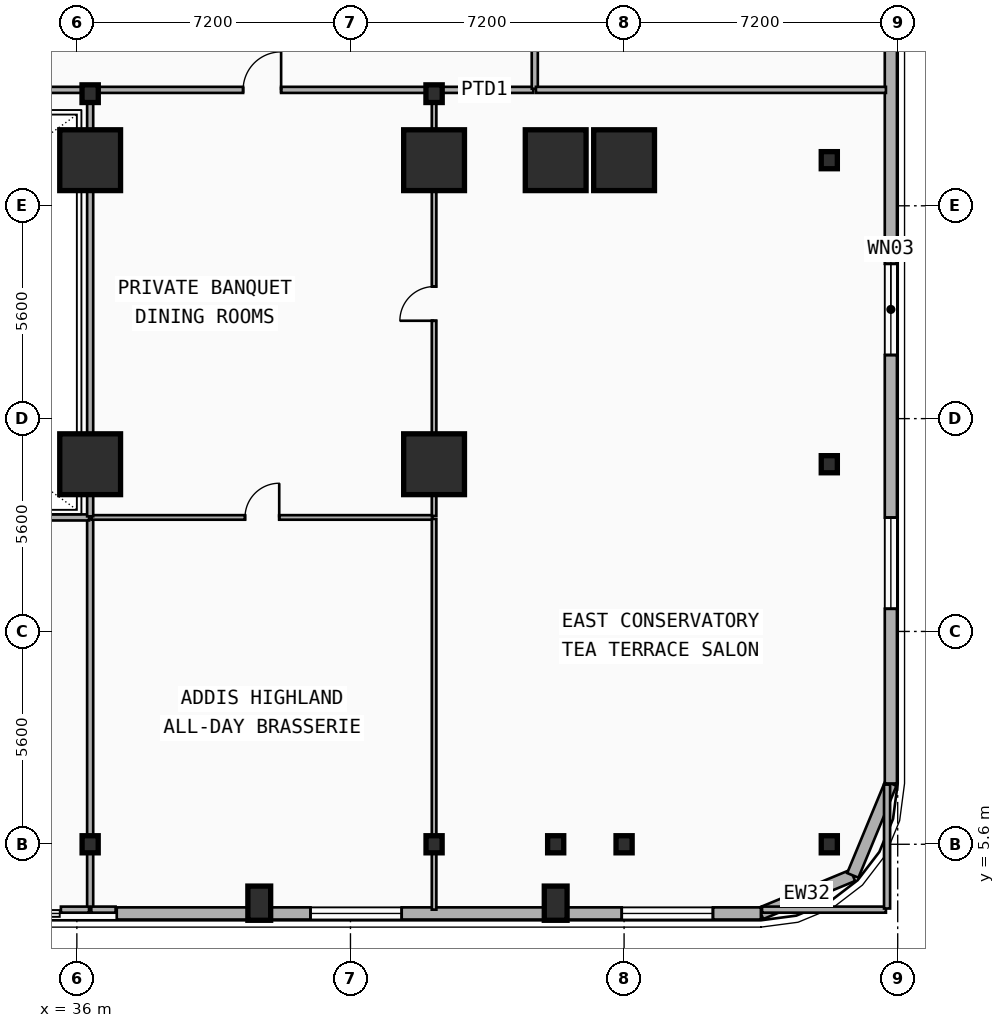
"""IFC4 building model, lengths in metres.
Left out: names, types, materials, properties, quantities, classifications, styles, units other than length and angle.
Written with IfcOpenShell. Run it as: python <this file> out.ifc"""

import sys

from ifc_helpers import new_model, si_unit, direction, frame, frame_2d, origin, origin_2d, place, context, subcontext, project, spatial, rectangle, i_section, extrude, element, fill, save


model = new_model("IFC4")
c1 = context("Model", 3, precision=1e-05, world=origin(), true_north=direction((0.0, 1.0)))
c2 = subcontext(c1, "Body", "Model", "MODEL_VIEW")
j1 = project(units=[si_unit("LENGTHUNIT", "METRE"), si_unit("PLANEANGLEUNIT", "RADIAN")], contexts=[c1])
p1 = place(None, origin())
s1 = spatial("IfcSite", under=j1, at=p1, CompositionType="ELEMENT")
p2 = place(p1, origin())
s2 = spatial("IfcBuilding", under=s1, at=p2, CompositionType="ELEMENT")
p3 = place(p2, frame((0.0, 0.0, 14.9)))
s3 = spatial("IfcBuildingStorey", under=s2, at=p3, CompositionType="ELEMENT", Elevation=14.9)
for number, where, z_axis, x_axis in (
    (1, (36.35, 25.35, 0.0), (0.0, 0.0, 1.0), (1.0, 0.0, 0.0)),
    (2, (45.4, 25.35, 0.0), (0.0, 0.0, 1.0), (1.0, 0.0, 0.0)),
):
    element("IfcColumn", number, at=place(p3, frame(where, z_axis=z_axis, x_axis=x_axis)), inside=s3, PredefinedType="COLUMN", context=c2, shape_type="SweptSolid", body=[
        extrude(i_section(OverallWidth=0.428, OverallDepth=0.465, WebThickness=0.045, FlangeThickness=0.073, FilletRadius=0.015, at=origin_2d()), origin(), (0.0, 0.0, 1.0), 4.5),
    ])
p4 = place(p3, frame((36.35, 5.6, 0.0), z_axis=(0.0, 0.0, 1.0), x_axis=(1.0, 0.0, 0.0)))
e3 = element("IfcColumn", 3, at=p4, inside=s3, PredefinedType="COLUMN", context=c2, shape_type="SweptSolid", body=[
    extrude(i_section(OverallWidth=0.424, OverallDepth=0.45, WebThickness=0.041, FlangeThickness=0.065, FilletRadius=0.015, at=origin_2d()), origin(), (0.0, 0.0, 1.0), 4.5),
])
for number, where, z_axis, x_axis in (
    (4, (36.35, 15.6, 0.0), (0.0, 0.0, 1.0), (1.0, 0.0, 0.0)),
    (5, (36.35, 23.6, 0.0), (0.0, 0.0, 1.0), (1.0, 0.0, 0.0)),
):
    element("IfcColumn", number, at=place(p3, frame(where, z_axis=z_axis, x_axis=x_axis)), inside=s3, PredefinedType="COLUMN", context=c2, shape_type="SweptSolid", body=[
        extrude(rectangle(XDim=1.6, YDim=1.6, at=origin_2d()), origin(), (0.0, 0.0, 1.0), 4.5),
    ])
p5 = place(p3, frame((45.4, 5.6, 0.0), z_axis=(0.0, 0.0, 1.0), x_axis=(1.0, 0.0, 0.0)))
e6 = element("IfcColumn", 6, at=p5, inside=s3, PredefinedType="COLUMN", context=c2, shape_type="SweptSolid", body=[
    extrude(i_section(OverallWidth=0.424, OverallDepth=0.45, WebThickness=0.041, FlangeThickness=0.065, FilletRadius=0.015, at=origin_2d()), origin(), (0.0, 0.0, 1.0), 4.5),
])
for number, where, z_axis, x_axis in (
    (7, (45.4, 15.6, 0.0), (0.0, 0.0, 1.0), (1.0, 0.0, 0.0)),
    (8, (45.4, 23.6, 0.0), (0.0, 0.0, 1.0), (1.0, 0.0, 0.0)),
):
    element("IfcColumn", number, at=place(p3, frame(where, z_axis=z_axis, x_axis=x_axis)), inside=s3, PredefinedType="COLUMN", context=c2, shape_type="SweptSolid", body=[
        extrude(rectangle(XDim=1.6, YDim=1.6, at=origin_2d()), origin(), (0.0, 0.0, 1.0), 4.5),
    ])
p6 = place(p3, frame((48.6, 5.6, 0.0), z_axis=(0.0, 0.0, 1.0), x_axis=(1.0, 0.0, 0.0)))
e9 = element("IfcColumn", 9, at=p6, inside=s3, PredefinedType="COLUMN", context=c2, shape_type="SweptSolid", body=[
    extrude(i_section(OverallWidth=0.424, OverallDepth=0.45, WebThickness=0.041, FlangeThickness=0.065, FilletRadius=0.015, at=origin_2d()), origin(), (0.0, 0.0, 1.0), 4.5),
])
p7 = place(p3, frame((48.6, 23.6, 0.0), z_axis=(0.0, 0.0, 1.0), x_axis=(1.0, 0.0, 0.0)))
e10 = element("IfcColumn", 10, at=p7, inside=s3, PredefinedType="COLUMN", context=c2, shape_type="SweptSolid", body=[
    extrude(rectangle(XDim=1.6, YDim=1.6, at=origin_2d()), origin(), (0.0, 0.0, 1.0), 4.5),
])
p8 = place(p3, frame((50.4, 5.6, 0.0), z_axis=(0.0, 0.0, 1.0), x_axis=(1.0, 0.0, 0.0)))
e11 = element("IfcColumn", 11, at=p8, inside=s3, PredefinedType="COLUMN", context=c2, shape_type="SweptSolid", body=[
    extrude(i_section(OverallWidth=0.424, OverallDepth=0.45, WebThickness=0.041, FlangeThickness=0.065, FilletRadius=0.015, at=origin_2d()), origin(), (0.0, 0.0, 1.0), 4.5),
])
p9 = place(p3, frame((50.4, 23.6, 0.0), z_axis=(0.0, 0.0, 1.0), x_axis=(1.0, 0.0, 0.0)))
e12 = element("IfcColumn", 12, at=p9, inside=s3, PredefinedType="COLUMN", context=c2, shape_type="SweptSolid", body=[
    extrude(rectangle(XDim=1.6, YDim=1.6, at=origin_2d()), origin(), (0.0, 0.0, 1.0), 4.5),
])
for number, where, z_axis, x_axis in (
    (13, (55.8, 5.6, 0.0), (0.0, 0.0, 1.0), (1.0, 0.0, 0.0)),
    (14, (55.8, 15.6, 0.0), (0.0, 0.0, 1.0), (1.0, 0.0, 0.0)),
    (15, (55.8, 23.6, 0.0), (0.0, 0.0, 1.0), (1.0, 0.0, 0.0)),
):
    element("IfcColumn", number, at=place(p3, frame(where, z_axis=z_axis, x_axis=x_axis)), inside=s3, PredefinedType="COLUMN", context=c2, shape_type="SweptSolid", body=[
        extrude(i_section(OverallWidth=0.424, OverallDepth=0.45, WebThickness=0.041, FlangeThickness=0.065, FilletRadius=0.015, at=origin_2d()), origin(), (0.0, 0.0, 1.0), 4.5),
    ])
for number, where, z_axis, x_axis in (
    (16, (40.8, 4.05, 0.0), (0.0, 0.0, 1.0), (1.0, 0.0, 0.0)),
    (17, (48.6, 4.05, 0.0), (0.0, 0.0, 1.0), (1.0, 0.0, 0.0)),
):
    element("IfcColumn", number, at=place(p3, frame(where, z_axis=z_axis, x_axis=x_axis)), inside=s3, PredefinedType="PILASTER", context=c2, shape_type="SweptSolid", body=[
        extrude(rectangle(XDim=0.6, YDim=0.9, at=origin_2d()), origin(), (0.0, 0.0, 1.0), 4.5),
    ])
for number, where, z_axis, x_axis in (
    (18, (56.418, 4.782, 0.0), (0.0, 0.0, 1.0), (-0.924, -0.383, 0.0)),
    (19, (57.42, 7.2, 0.0), (0.0, 0.0, 1.0), (-0.383, -0.924, 0.0)),
):
    element("IfcWall", number, at=place(p3, frame(where, z_axis=z_axis, x_axis=x_axis)), inside=s3, PredefinedType="SOLIDWALL", context=c2, shape_type="SweptSolid", body=[
        extrude(rectangle(XDim=2.617, YDim=0.32, at=frame_2d((1.309, 0.0))), origin(), (0.0, 0.0, 1.0), 4.2),
    ])
p10 = place(p3, frame((57.42, 41.6, 0.0), z_axis=(0.0, 0.0, 1.0), x_axis=(0.0, -1.0, 0.0)))
e20 = element("IfcWall", 20, at=p10, inside=s3, PredefinedType="SOLIDWALL", context=c2, shape_type="SweptSolid", body=[
    extrude(rectangle(XDim=34.4, YDim=0.32, at=frame_2d((17.2, 0.0))), origin(), (0.0, 0.0, 1.0), 4.2),
])
p11 = place(p10, frame((20.727, 0.0, 0.9)))
e21 = element("IfcOpeningElement", 21, at=p11, cuts=e20, PredefinedType="OPENING", context=c2, shape_type="SweptSolid", body=[
    extrude(rectangle(XDim=2.4, YDim=1.8, at=frame_2d((1.2, 0.9))), frame((0.0, 0.17, 0.0), z_axis=(0.0, -1.0, 0.0), x_axis=(1.0, 0.0, 0.0)), (0.0, 0.0, 1.0), 0.34),
])
p12 = place(p10, frame((27.403, 0.0, 0.9)))
e22 = element("IfcOpeningElement", 22, at=p12, cuts=e20, PredefinedType="OPENING", context=c2, shape_type="SweptSolid", body=[
    extrude(rectangle(XDim=2.4, YDim=1.8, at=frame_2d((1.2, 0.9))), frame((0.0, 0.17, 0.0), z_axis=(0.0, -1.0, 0.0), x_axis=(1.0, 0.0, 0.0)), (0.0, 0.0, 1.0), 0.34),
])
p13 = place(p3, frame((54.0, 3.78, 0.0), z_axis=(0.0, 0.0, 1.0), x_axis=(-1.0, 0.0, 0.0)))
e23 = element("IfcWall", 23, at=p13, inside=s3, PredefinedType="SOLIDWALL", context=c2, shape_type="SweptSolid", body=[
    extrude(rectangle(XDim=16.95, YDim=0.32, at=frame_2d((8.475, 0.0))), origin(), (0.0, 0.0, 1.0), 4.2),
])
p14 = place(p13, frame((9.452, 0.0, 0.9)))
e24 = element("IfcOpeningElement", 24, at=p14, cuts=e23, PredefinedType="OPENING", context=c2, shape_type="SweptSolid", body=[
    extrude(rectangle(XDim=2.4, YDim=1.8, at=frame_2d((1.2, 0.9))), frame((0.0, 0.17, 0.0), z_axis=(0.0, -1.0, 0.0), x_axis=(1.0, 0.0, 0.0)), (0.0, 0.0, 1.0), 0.34),
])
p15 = place(p13, frame((1.262, 0.0, 0.9)))
e25 = element("IfcOpeningElement", 25, at=p15, cuts=e23, PredefinedType="OPENING", context=c2, shape_type="SweptSolid", body=[
    extrude(rectangle(XDim=2.4, YDim=1.8, at=frame_2d((1.2, 0.9))), frame((0.0, 0.17, 0.0), z_axis=(0.0, -1.0, 0.0), x_axis=(1.0, 0.0, 0.0)), (0.0, 0.0, 1.0), 0.34),
])
p16 = place(p3, frame((36.39, 25.45, 0.0), z_axis=(0.0, 0.0, 1.0), x_axis=(1.0, 0.0, 0.0)))
e26 = element("IfcWall", 26, at=p16, inside=s3, PredefinedType="PARTITIONING", context=c2, shape_type="SweptSolid", body=[
    extrude(rectangle(XDim=8.97, YDim=0.16, at=frame_2d((4.485, 0.0))), origin(), (0.0, 0.0, 1.0), 3.366),
])
p17 = place(p16, frame((3.985, 0.0, 0.0)))
e27 = element("IfcOpeningElement", 27, at=p17, cuts=e26, PredefinedType="OPENING", context=c2, shape_type="SweptSolid", body=[
    extrude(rectangle(XDim=1.0, YDim=2.15, at=frame_2d((0.5, 1.075))), frame((0.0, 0.09, 0.0), z_axis=(0.0, -1.0, 0.0), x_axis=(1.0, 0.0, 0.0)), (0.0, 0.0, 1.0), 0.18),
])
p18 = place(p3, frame((45.44, 25.45, 0.0), z_axis=(0.0, 0.0, 1.0), x_axis=(1.0, 0.0, 0.0)))
e28 = element("IfcWall", 28, at=p18, inside=s3, PredefinedType="PARTITIONING", context=c2, shape_type="SweptSolid", body=[
    extrude(rectangle(XDim=2.57, YDim=0.16, at=frame_2d((1.285, 0.0))), origin(), (0.0, 0.0, 1.0), 3.366),
])
p19 = place(p3, frame((36.35, 3.88, 0.0), z_axis=(0.0, 0.0, 1.0), x_axis=(0.0, 1.0, 0.0)))
e29 = element("IfcWall", 29, at=p19, inside=s3, PredefinedType="PARTITIONING", context=c2, shape_type="SweptSolid", body=[
    extrude(rectangle(XDim=10.28, YDim=0.16, at=frame_2d((5.14, 0.0))), origin(), (0.0, 0.0, 1.0), 3.366),
])
p20 = place(p3, frame((36.39, 14.2, 0.0), z_axis=(0.0, 0.0, 1.0), x_axis=(1.0, 0.0, 0.0)))
e30 = element("IfcWall", 30, at=p20, inside=s3, PredefinedType="PARTITIONING", context=c2, shape_type="SweptSolid", body=[
    extrude(rectangle(XDim=8.97, YDim=0.12, at=frame_2d((4.485, 0.0))), origin(), (0.0, 0.0, 1.0), 3.366),
])
p21 = place(p20, frame((4.035, 0.0, 0.0)))
e31 = element("IfcOpeningElement", 31, at=p21, cuts=e30, PredefinedType="OPENING", context=c2, shape_type="SweptSolid", body=[
    extrude(rectangle(XDim=0.9, YDim=2.1, at=frame_2d((0.45, 1.05))), frame((0.0, 0.07, 0.0), z_axis=(0.0, -1.0, 0.0), x_axis=(1.0, 0.0, 0.0)), (0.0, 0.0, 1.0), 0.14),
])
p22 = place(p3, frame((45.4, 3.88, 0.0), z_axis=(0.0, 0.0, 1.0), x_axis=(0.0, 1.0, 0.0)))
e32 = element("IfcWall", 32, at=p22, inside=s3, PredefinedType="PARTITIONING", context=c2, shape_type="SweptSolid", body=[
    extrude(rectangle(XDim=10.28, YDim=0.12, at=frame_2d((5.14, 0.0))), origin(), (0.0, 0.0, 1.0), 3.366),
])
p23 = place(p3, frame((45.4, 14.24, 0.0), z_axis=(0.0, 0.0, 1.0), x_axis=(0.0, 1.0, 0.0)))
e33 = element("IfcWall", 33, at=p23, inside=s3, PredefinedType="PARTITIONING", context=c2, shape_type="SweptSolid", body=[
    extrude(rectangle(XDim=11.17, YDim=0.12, at=frame_2d((5.585, 0.0))), origin(), (0.0, 0.0, 1.0), 3.172),
])
p24 = place(p23, frame((5.135, 0.0, 0.0)))
e34 = element("IfcOpeningElement", 34, at=p24, cuts=e33, PredefinedType="OPENING", context=c2, shape_type="SweptSolid", body=[
    extrude(rectangle(XDim=0.9, YDim=2.1, at=frame_2d((0.45, 1.05))), frame((0.0, 0.07, 0.0), z_axis=(0.0, -1.0, 0.0), x_axis=(1.0, 0.0, 0.0)), (0.0, 0.0, 1.0), 0.14),
])
p25 = place(p3, frame((20.38, 25.45, 0.0), z_axis=(0.0, 0.0, 1.0), x_axis=(1.0, 0.0, 0.0)))
e35 = element("IfcWall", 35, at=p25, inside=s3, PredefinedType="PARTITIONING", context=c2, shape_type="SweptSolid", body=[
    extrude(rectangle(XDim=15.94, YDim=0.16, at=frame_2d((7.97, 0.0))), origin(), (0.0, 0.0, 1.0), 3.366),
])
p26 = place(p3, frame((48.05, 25.48, 0.0), z_axis=(0.0, 0.0, 1.0), x_axis=(0.0, 1.0, 0.0)))
e36 = element("IfcWall", 36, at=p26, inside=s3, PredefinedType="PARTITIONING", context=c2, shape_type="SweptSolid", body=[
    extrude(rectangle(XDim=2.09, YDim=0.16, at=frame_2d((1.045, 0.0))), origin(), (0.0, 0.0, 1.0), 4.2),
])
p27 = place(p3, frame((35.58, 3.88, 0.0), z_axis=(0.0, 0.0, 1.0), x_axis=(1.0, 0.0, 0.0)))
e37 = element("IfcWall", 37, at=p27, inside=s3, PredefinedType="PARTITIONING", context=c2, shape_type="SweptSolid", body=[
    extrude(rectangle(XDim=0.74, YDim=0.16, at=frame_2d((0.37, 0.0))), origin(), (0.0, 0.0, 1.0), 4.2),
])
p28 = place(p3, frame((20.38, 14.2, 0.0), z_axis=(0.0, 0.0, 1.0), x_axis=(1.0, 0.0, 0.0)))
e38 = element("IfcWall", 38, at=p28, inside=s3, PredefinedType="PARTITIONING", context=c2, shape_type="SweptSolid", body=[
    extrude(rectangle(XDim=15.94, YDim=0.16, at=frame_2d((7.97, 0.0))), origin(), (0.0, 0.0, 1.0), 3.366),
])
p29 = place(p3, frame((36.38, 3.88, 0.0), z_axis=(0.0, 0.0, 1.0), x_axis=(1.0, 0.0, 0.0)))
e39 = element("IfcWall", 39, at=p29, inside=s3, PredefinedType="PARTITIONING", context=c2, shape_type="SweptSolid", body=[
    extrude(rectangle(XDim=0.64, YDim=0.16, at=frame_2d((0.32, 0.0))), origin(), (0.0, 0.0, 1.0), 4.2),
])
p30 = place(p3, frame((36.35, 14.23, 0.0), z_axis=(0.0, 0.0, 1.0), x_axis=(0.0, 1.0, 0.0)))
e40 = element("IfcWall", 40, at=p30, inside=s3, PredefinedType="PARTITIONING", context=c2, shape_type="SweptSolid", body=[
    extrude(rectangle(XDim=11.19, YDim=0.16, at=frame_2d((5.595, 0.0))), origin(), (0.0, 0.0, 1.0), 3.172),
])
p31 = place(p3, frame((54.03, 3.88, 0.0), z_axis=(0.0, 0.0, 1.0), x_axis=(1.0, 0.0, 0.0)))
e41 = element("IfcWall", 41, at=p31, inside=s3, PredefinedType="PARTITIONING", context=c2, shape_type="SweptSolid", body=[
    extrude(rectangle(XDim=3.26, YDim=0.16, at=frame_2d((1.63, 0.0))), origin(), (0.0, 0.0, 1.0), 4.2),
])
p32 = place(p3, frame((48.08, 25.45, 0.0), z_axis=(0.0, 0.0, 1.0), x_axis=(1.0, 0.0, 0.0)))
e42 = element("IfcWall", 42, at=p32, inside=s3, PredefinedType="PARTITIONING", context=c2, shape_type="SweptSolid", body=[
    extrude(rectangle(XDim=9.21, YDim=0.16, at=frame_2d((4.605, 0.0))), origin(), (0.0, 0.0, 1.0), 4.2),
])
p33 = place(p3, frame((57.32, 3.91, 0.0), z_axis=(0.0, 0.0, 1.0), x_axis=(0.0, 1.0, 0.0)))
e43 = element("IfcWall", 43, at=p33, inside=s3, PredefinedType="PARTITIONING", context=c2, shape_type="SweptSolid", body=[
    extrude(rectangle(XDim=3.26, YDim=0.16, at=frame_2d((1.63, 0.0))), origin(), (0.0, 0.0, 1.0), 4.2),
])
p34 = place(p11, origin())
e44 = element("IfcWindow", 44, at=p34, inside=s3, PartitioningType="SINGLE_PANEL", PredefinedType="WINDOW", context=c2, shape_type="SweptSolid", body=[
    extrude(rectangle(XDim=2.4, YDim=1.8, at=frame_2d((1.2, 0.9))), frame((0.0, 0.03, 0.0), z_axis=(0.0, -1.0, 0.0), x_axis=(1.0, 0.0, 0.0)), (0.0, 0.0, 1.0), 0.06),
])
fill(e21, e44)
p35 = place(p12, origin())
e45 = element("IfcWindow", 45, at=p35, inside=s3, PartitioningType="SINGLE_PANEL", PredefinedType="WINDOW", context=c2, shape_type="SweptSolid", body=[
    extrude(rectangle(XDim=2.4, YDim=1.8, at=frame_2d((1.2, 0.9))), frame((0.0, 0.03, 0.0), z_axis=(0.0, -1.0, 0.0), x_axis=(1.0, 0.0, 0.0)), (0.0, 0.0, 1.0), 0.06),
])
fill(e22, e45)
p36 = place(p14, origin())
e46 = element("IfcWindow", 46, at=p36, inside=s3, PartitioningType="SINGLE_PANEL", PredefinedType="WINDOW", context=c2, shape_type="SweptSolid", body=[
    extrude(rectangle(XDim=2.4, YDim=1.8, at=frame_2d((1.2, 0.9))), frame((0.0, 0.03, 0.0), z_axis=(0.0, -1.0, 0.0), x_axis=(1.0, 0.0, 0.0)), (0.0, 0.0, 1.0), 0.06),
])
fill(e24, e46)
p37 = place(p15, origin())
e47 = element("IfcWindow", 47, at=p37, inside=s3, PartitioningType="SINGLE_PANEL", PredefinedType="WINDOW", context=c2, shape_type="SweptSolid", body=[
    extrude(rectangle(XDim=2.4, YDim=1.8, at=frame_2d((1.2, 0.9))), frame((0.0, 0.03, 0.0), z_axis=(0.0, -1.0, 0.0), x_axis=(1.0, 0.0, 0.0)), (0.0, 0.0, 1.0), 0.06),
])
fill(e25, e47)
p38 = place(p17, origin())
e48 = element("IfcDoor", 48, at=p38, inside=s3, OperationType="SINGLE_SWING_RIGHT", PredefinedType="DOOR", context=c2, shape_type="SweptSolid", body=[
    extrude(rectangle(XDim=1.0, YDim=2.15, at=frame_2d((0.5, 1.075))), frame((0.0, 0.025, 0.0), z_axis=(0.0, -1.0, 0.0), x_axis=(1.0, 0.0, 0.0)), (0.0, 0.0, 1.0), 0.05),
])
fill(e27, e48)
p39 = place(p21, origin())
e49 = element("IfcDoor", 49, at=p39, inside=s3, OperationType="SINGLE_SWING_RIGHT", PredefinedType="DOOR", context=c2, shape_type="SweptSolid", body=[
    extrude(rectangle(XDim=0.9, YDim=2.1, at=frame_2d((0.45, 1.05))), frame((0.0, 0.025, 0.0), z_axis=(0.0, -1.0, 0.0), x_axis=(1.0, 0.0, 0.0)), (0.0, 0.0, 1.0), 0.05),
])
fill(e31, e49)
p40 = place(p24, origin())
e50 = element("IfcDoor", 50, at=p40, inside=s3, OperationType="SINGLE_SWING_LEFT", PredefinedType="DOOR", context=c2, shape_type="SweptSolid", body=[
    extrude(rectangle(XDim=0.9, YDim=2.1, at=frame_2d((0.45, 1.05))), frame((0.0, 0.025, 0.0), z_axis=(0.0, -1.0, 0.0), x_axis=(1.0, 0.0, 0.0)), (0.0, 0.0, 1.0), 0.05),
])
fill(e34, e50)
save(model, sys.argv[1])
